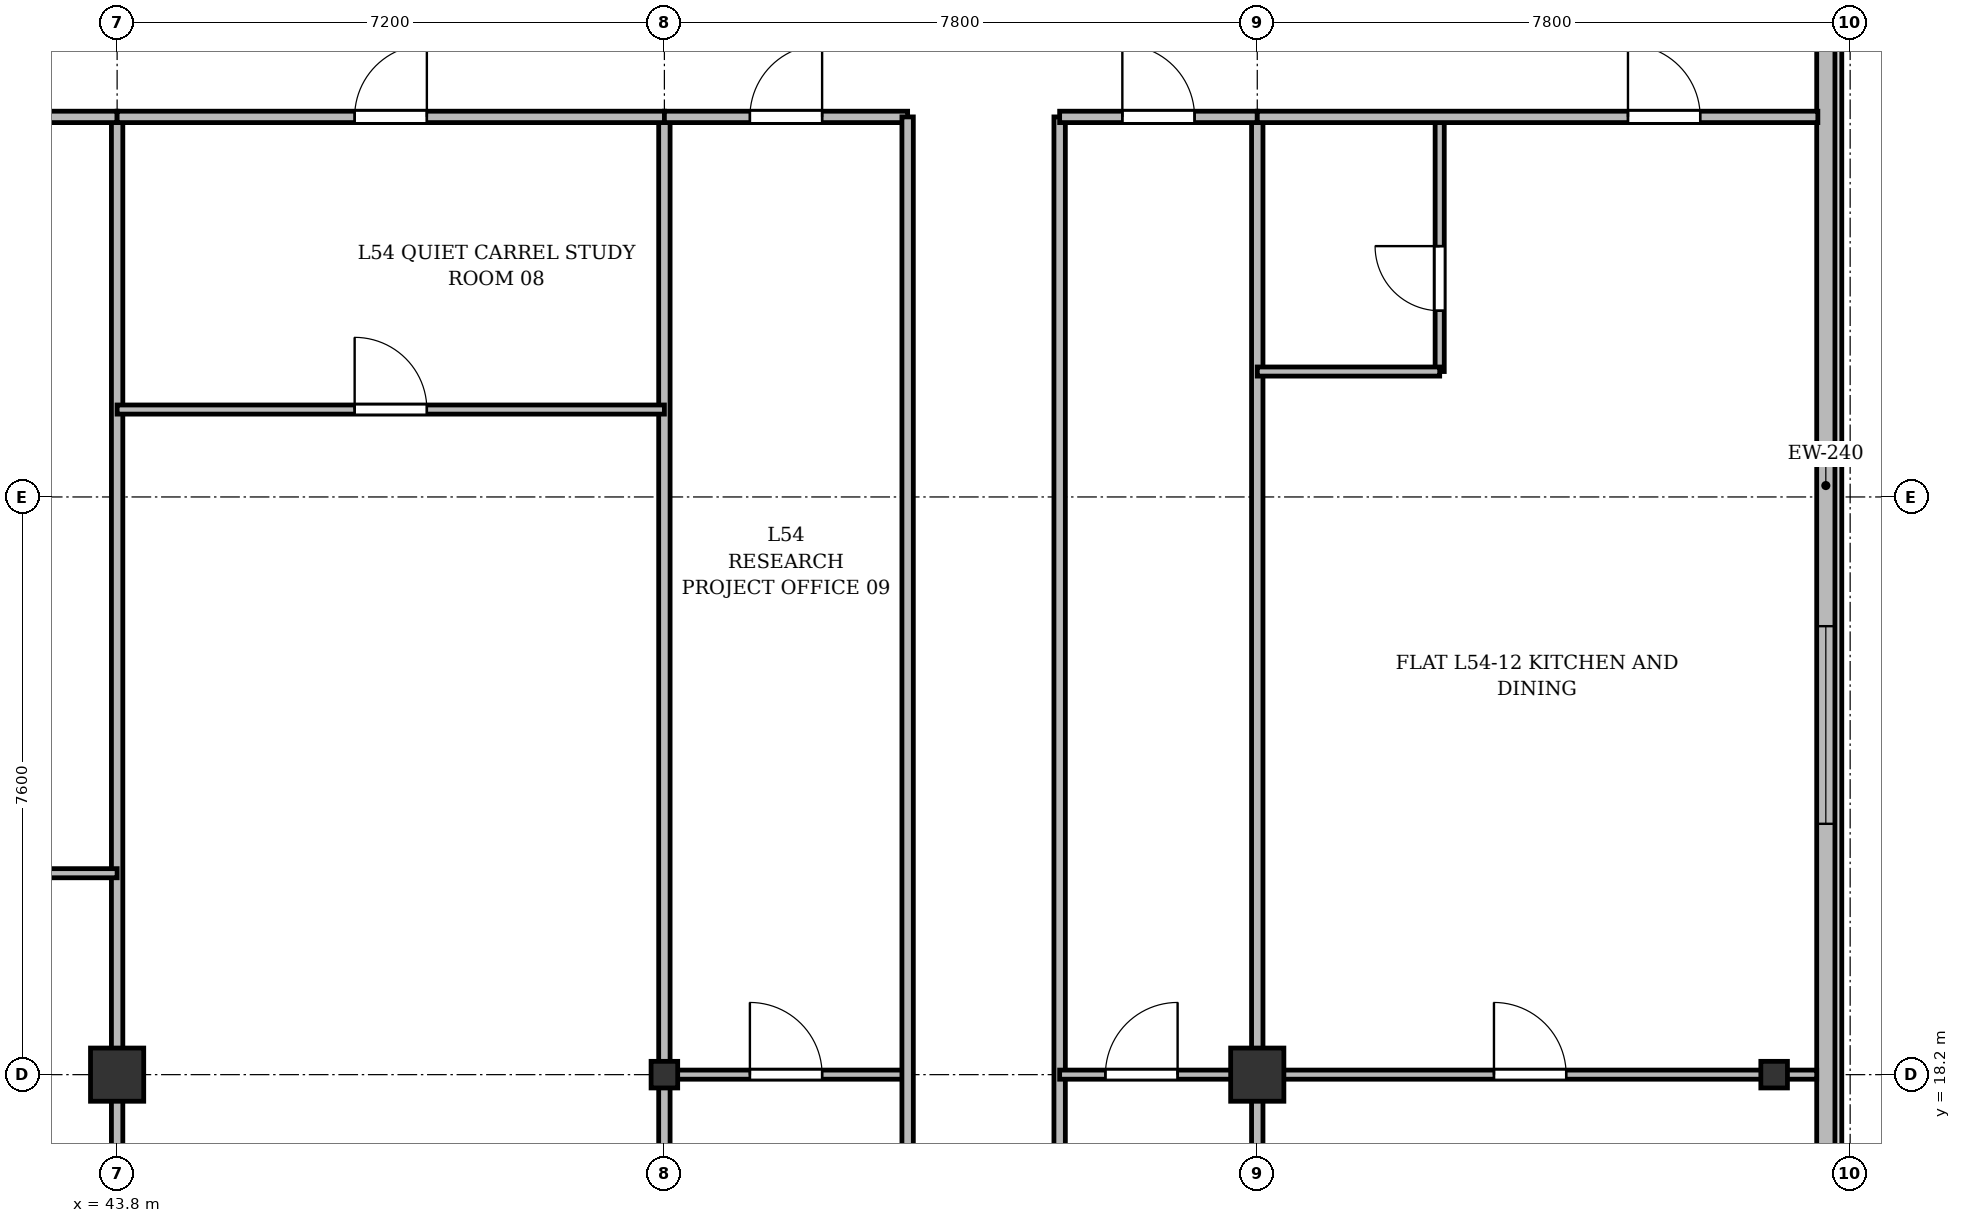
"""IFC4 building model, lengths in metres.
Left out: names, types, materials, properties, quantities, classifications, styles, units other than length and angle.
Written with IfcOpenShell. Run it as: python <this file> out.ifc"""

import sys

from ifc_helpers import new_model, si_unit, direction, frame, frame_2d, origin, origin_2d, place, context, subcontext, project, spatial, rectangle, i_section, extrude, source, transform, mapped, element, fill, save


model = new_model("IFC4")
c1 = context("Model", 3, precision=1e-05, world=origin(), true_north=direction((0.0, 1.0)))
c2 = subcontext(c1, "Body", "Model", "MODEL_VIEW")
j1 = project(units=[si_unit("LENGTHUNIT", "METRE"), si_unit("PLANEANGLEUNIT", "RADIAN")], contexts=[c1])
p1 = place(None, origin())
s1 = spatial("IfcSite", under=j1, at=p1, CompositionType="ELEMENT")
p2 = place(p1, origin())
s2 = spatial("IfcBuilding", under=s1, at=p2, CompositionType="ELEMENT")
p3 = place(p2, frame((0.0, 0.0, 208.5)))
s3 = spatial("IfcBuildingStorey", under=s2, at=p3, CompositionType="ELEMENT", Elevation=208.5)
m1 = source(origin(), c2, "Body", "SweptSolid", [
    extrude(rectangle(XDim=0.7, YDim=0.7, at=origin_2d()), origin(), (0.0, 0.0, 1.0), 3.6),
])
p4 = place(p3, frame((43.8, 18.2, 0.0), z_axis=(0.0, 0.0, 1.0), x_axis=(1.0, 0.0, 0.0)))
e1 = element("IfcColumn", 1, at=p4, inside=s3, PredefinedType="COLUMN", context=c2, shape_type="MappedRepresentation", body=[
    mapped(m1, transform((0.0, 0.0, 0.0), x_axis=(1.0, 0.0, 0.0), y_axis=(0.0, 1.0, 0.0), z_axis=(0.0, 0.0, 1.0), scale=1.0)),
])
m2 = source(origin(), c2, "Body", "SweptSolid", [
    extrude(i_section(OverallWidth=0.35, OverallDepth=0.35, WebThickness=0.018, FlangeThickness=0.028, at=origin_2d()), origin(), (0.0, 0.0, 1.0), 3.6),
])
p5 = place(p3, frame((51.0, 18.2, 0.0), z_axis=(0.0, 0.0, 1.0), x_axis=(1.0, 0.0, 0.0)))
e2 = element("IfcColumn", 2, at=p5, inside=s3, PredefinedType="COLUMN", context=c2, shape_type="MappedRepresentation", body=[
    mapped(m2, transform((0.0, 0.0, 0.0), x_axis=(1.0, 0.0, 0.0), y_axis=(0.0, 1.0, 0.0), z_axis=(0.0, 0.0, 1.0), scale=1.0)),
])
p6 = place(p3, frame((58.8, 18.2, 0.0), z_axis=(0.0, 0.0, 1.0), x_axis=(1.0, 0.0, 0.0)))
e3 = element("IfcColumn", 3, at=p6, inside=s3, PredefinedType="COLUMN", context=c2, shape_type="MappedRepresentation", body=[
    mapped(m1, transform((0.0, 0.0, 0.0), x_axis=(1.0, 0.0, 0.0), y_axis=(0.0, 1.0, 0.0), z_axis=(0.0, 0.0, 1.0), scale=1.0)),
])
p7 = place(p3, frame((65.6, 18.2, 0.0), z_axis=(0.0, 0.0, 1.0), x_axis=(1.0, 0.0, 0.0)))
e4 = element("IfcColumn", 4, at=p7, inside=s3, PredefinedType="COLUMN", context=c2, shape_type="MappedRepresentation", body=[
    mapped(m2, transform((0.0, 0.0, 0.0), x_axis=(1.0, 0.0, 0.0), y_axis=(0.0, 1.0, 0.0), z_axis=(0.0, 0.0, 1.0), scale=1.0)),
])
p8 = place(p3, frame((66.28, 45.5, 0.0), z_axis=(0.0, 0.0, 1.0), x_axis=(0.0, -1.0, 0.0)))
e5 = element("IfcWall", 5, at=p8, inside=s3, PredefinedType="SOLIDWALL", context=c2, shape_type="SweptSolid", body=[
    extrude(rectangle(XDim=39.1, YDim=0.24, at=frame_2d((19.55, 0.0))), origin(), (0.0, 0.0, 1.0), 3.36),
])
p9 = place(p8, frame((36.45, 0.0, 0.92)))
e6 = element("IfcOpeningElement", 6, at=p9, cuts=e5, PredefinedType="OPENING", context=c2, shape_type="SweptSolid", body=[
    extrude(rectangle(XDim=1.2, YDim=1.65, at=frame_2d((0.6, 0.825))), frame((0.0, 0.13, 0.0), z_axis=(0.0, -1.0, 0.0), x_axis=(1.0, 0.0, 0.0)), (0.0, 0.0, 1.0), 0.26),
])
p10 = place(p8, frame((32.8, 0.0, 0.92)))
e7 = element("IfcOpeningElement", 7, at=p10, cuts=e5, PredefinedType="OPENING", context=c2, shape_type="SweptSolid", body=[
    extrude(rectangle(XDim=2.6, YDim=1.9, at=frame_2d((1.3, 0.95))), frame((0.0, 0.13, 0.0), z_axis=(0.0, -1.0, 0.0), x_axis=(1.0, 0.0, 0.0)), (0.0, 0.0, 1.0), 0.26),
])
p11 = place(p8, frame((28.6, 0.0, 0.92)))
e8 = element("IfcOpeningElement", 8, at=p11, cuts=e5, PredefinedType="OPENING", context=c2, shape_type="SweptSolid", body=[
    extrude(rectangle(XDim=2.6, YDim=1.9, at=frame_2d((1.3, 0.95))), frame((0.0, 0.13, 0.0), z_axis=(0.0, -1.0, 0.0), x_axis=(1.0, 0.0, 0.0)), (0.0, 0.0, 1.0), 0.26),
])
p12 = place(p8, frame((21.4, 0.0, 0.92)))
e9 = element("IfcOpeningElement", 9, at=p12, cuts=e5, PredefinedType="OPENING", context=c2, shape_type="SweptSolid", body=[
    extrude(rectangle(XDim=2.6, YDim=1.9, at=frame_2d((1.3, 0.95))), frame((0.0, 0.13, 0.0), z_axis=(0.0, -1.0, 0.0), x_axis=(1.0, 0.0, 0.0)), (0.0, 0.0, 1.0), 0.26),
])
p13 = place(p8, frame((7.4, 0.0, 0.92)))
e10 = element("IfcOpeningElement", 10, at=p13, cuts=e5, PredefinedType="OPENING", context=c2, shape_type="SweptSolid", body=[
    extrude(rectangle(XDim=2.6, YDim=1.9, at=frame_2d((1.3, 0.95))), frame((0.0, 0.13, 0.0), z_axis=(0.0, -1.0, 0.0), x_axis=(1.0, 0.0, 0.0)), (0.0, 0.0, 1.0), 0.26),
])
p14 = place(p8, frame((4.5, 0.0, 0.92)))
e11 = element("IfcOpeningElement", 11, at=p14, cuts=e5, PredefinedType="OPENING", context=c2, shape_type="SweptSolid", body=[
    extrude(rectangle(XDim=1.2, YDim=1.65, at=frame_2d((0.6, 0.825))), frame((0.0, 0.13, 0.0), z_axis=(0.0, -1.0, 0.0), x_axis=(1.0, 0.0, 0.0)), (0.0, 0.0, 1.0), 0.26),
])
p15 = place(p8, frame((1.15, 0.0, 0.92)))
e12 = element("IfcOpeningElement", 12, at=p15, cuts=e5, PredefinedType="OPENING", context=c2, shape_type="SweptSolid", body=[
    extrude(rectangle(XDim=1.2, YDim=1.65, at=frame_2d((0.6, 0.825))), frame((0.0, 0.13, 0.0), z_axis=(0.0, -1.0, 0.0), x_axis=(1.0, 0.0, 0.0)), (0.0, 0.0, 1.0), 0.26),
])
for number, where, z_axis, x_axis in (
    (13, (43.8, 3.625, 0.0), (0.0, 0.0, 1.0), (0.0, 1.0, 0.0)),
    (14, (51.0, 3.625, 0.0), (0.0, 0.0, 1.0), (0.0, 1.0, 0.0)),
    (15, (58.8, 3.625, 0.0), (0.0, 0.0, 1.0), (0.0, 1.0, 0.0)),
):
    element("IfcWall", number, at=place(p3, frame(where, z_axis=z_axis, x_axis=x_axis)), inside=s3, PredefinedType="PARTITIONING", context=c2, shape_type="SweptSolid", body=[
        extrude(rectangle(XDim=27.175, YDim=0.15, at=frame_2d((13.587, 0.0))), origin(), (0.0, 0.0, 1.0), 2.86),
    ])
p16 = place(p3, frame((35.8, 20.85, 0.0), z_axis=(0.0, 0.0, 1.0), x_axis=(1.0, 0.0, 0.0)))
e16 = element("IfcWall", 16, at=p16, inside=s3, PredefinedType="PARTITIONING", context=c2, shape_type="SweptSolid", body=[
    extrude(rectangle(XDim=8.0, YDim=0.12, at=frame_2d((4.0, 0.0))), origin(), (0.0, 0.0, 1.0), 2.86),
])
p17 = place(p16, frame((3.525, 0.0, 0.0)))
e17 = element("IfcOpeningElement", 17, at=p17, cuts=e16, PredefinedType="OPENING", context=c2, shape_type="SweptSolid", body=[
    extrude(rectangle(XDim=0.95, YDim=2.15, at=frame_2d((0.475, 1.075))), frame((0.0, 0.07, 0.0), z_axis=(0.0, -1.0, 0.0), x_axis=(1.0, 0.0, 0.0)), (0.0, 0.0, 1.0), 0.14),
])
p18 = place(p3, frame((35.8, 30.8, 0.0), z_axis=(0.0, 0.0, 1.0), x_axis=(1.0, 0.0, 0.0)))
e18 = element("IfcWall", 18, at=p18, inside=s3, PredefinedType="PARTITIONING", context=c2, shape_type="SweptSolid", body=[
    extrude(rectangle(XDim=8.0, YDim=0.15, at=frame_2d((4.0, 0.0))), origin(), (0.0, 0.0, 1.0), 2.86),
])
p19 = place(p18, frame((5.367, 0.0, 0.0)))
e19 = element("IfcOpeningElement", 19, at=p19, cuts=e18, PredefinedType="OPENING", context=c2, shape_type="SweptSolid", body=[
    extrude(rectangle(XDim=0.95, YDim=2.15, at=frame_2d((0.475, 1.075))), frame((0.0, 0.085, 0.0), z_axis=(0.0, -1.0, 0.0), x_axis=(1.0, 0.0, 0.0)), (0.0, 0.0, 1.0), 0.17),
])
p20 = place(p3, frame((43.8, 30.8, 0.0), z_axis=(0.0, 0.0, 1.0), x_axis=(1.0, 0.0, 0.0)))
e20 = element("IfcWall", 20, at=p20, inside=s3, PredefinedType="PARTITIONING", context=c2, shape_type="SweptSolid", body=[
    extrude(rectangle(XDim=7.2, YDim=0.15, at=frame_2d((3.6, 0.0))), origin(), (0.0, 0.0, 1.0), 2.86),
])
p21 = place(p20, frame((3.125, 0.0, 0.0)))
e21 = element("IfcOpeningElement", 21, at=p21, cuts=e20, PredefinedType="OPENING", context=c2, shape_type="SweptSolid", body=[
    extrude(rectangle(XDim=0.95, YDim=2.15, at=frame_2d((0.475, 1.075))), frame((0.0, 0.085, 0.0), z_axis=(0.0, -1.0, 0.0), x_axis=(1.0, 0.0, 0.0)), (0.0, 0.0, 1.0), 0.17),
])
p22 = place(p3, frame((43.8, 26.95, 0.0), z_axis=(0.0, 0.0, 1.0), x_axis=(1.0, 0.0, 0.0)))
e22 = element("IfcWall", 22, at=p22, inside=s3, PredefinedType="PARTITIONING", context=c2, shape_type="SweptSolid", body=[
    extrude(rectangle(XDim=7.2, YDim=0.12, at=frame_2d((3.6, 0.0))), origin(), (0.0, 0.0, 1.0), 2.86),
])
p23 = place(p22, frame((3.125, 0.0, 0.0)))
e23 = element("IfcOpeningElement", 23, at=p23, cuts=e22, PredefinedType="OPENING", context=c2, shape_type="SweptSolid", body=[
    extrude(rectangle(XDim=0.95, YDim=2.15, at=frame_2d((0.475, 1.075))), frame((0.0, 0.07, 0.0), z_axis=(0.0, -1.0, 0.0), x_axis=(1.0, 0.0, 0.0)), (0.0, 0.0, 1.0), 0.14),
])
p24 = place(p3, frame((51.0, 30.8, 0.0), z_axis=(0.0, 0.0, 1.0), x_axis=(1.0, 0.0, 0.0)))
e24 = element("IfcWall", 24, at=p24, inside=s3, PredefinedType="PARTITIONING", context=c2, shape_type="SweptSolid", body=[
    extrude(rectangle(XDim=3.2, YDim=0.15, at=frame_2d((1.6, 0.0))), origin(), (0.0, 0.0, 1.0), 2.86),
])
p25 = place(p24, frame((1.125, 0.0, 0.0)))
e25 = element("IfcOpeningElement", 25, at=p25, cuts=e24, PredefinedType="OPENING", context=c2, shape_type="SweptSolid", body=[
    extrude(rectangle(XDim=0.95, YDim=2.15, at=frame_2d((0.475, 1.075))), frame((0.0, 0.085, 0.0), z_axis=(0.0, -1.0, 0.0), x_axis=(1.0, 0.0, 0.0)), (0.0, 0.0, 1.0), 0.17),
])
p26 = place(p3, frame((51.0, 18.2, 0.0), z_axis=(0.0, 0.0, 1.0), x_axis=(1.0, 0.0, 0.0)))
e26 = element("IfcWall", 26, at=p26, inside=s3, PredefinedType="PARTITIONING", context=c2, shape_type="SweptSolid", body=[
    extrude(rectangle(XDim=3.2, YDim=0.12, at=frame_2d((1.6, 0.0))), origin(), (0.0, 0.0, 1.0), 2.91),
])
p27 = place(p26, frame((1.125, 0.0, 0.0)))
e27 = element("IfcOpeningElement", 27, at=p27, cuts=e26, PredefinedType="OPENING", context=c2, shape_type="SweptSolid", body=[
    extrude(rectangle(XDim=0.95, YDim=2.15, at=frame_2d((0.475, 1.075))), frame((0.0, 0.07, 0.0), z_axis=(0.0, -1.0, 0.0), x_axis=(1.0, 0.0, 0.0)), (0.0, 0.0, 1.0), 0.14),
])
for number, where, z_axis, x_axis in (
    (28, (54.2, 3.625, 0.0), (0.0, 0.0, 1.0), (0.0, 1.0, 0.0)),
    (29, (56.2, 3.625, 0.0), (0.0, 0.0, 1.0), (0.0, 1.0, 0.0)),
):
    element("IfcWall", number, at=place(p3, frame(where, z_axis=z_axis, x_axis=x_axis)), inside=s3, PredefinedType="PARTITIONING", context=c2, shape_type="SweptSolid", body=[
        extrude(rectangle(XDim=27.175, YDim=0.15, at=frame_2d((13.587, 0.0))), origin(), (0.0, 0.0, 1.0), 2.91),
    ])
p28 = place(p3, frame((56.2, 30.8, 0.0), z_axis=(0.0, 0.0, 1.0), x_axis=(1.0, 0.0, 0.0)))
e30 = element("IfcWall", 30, at=p28, inside=s3, PredefinedType="PARTITIONING", context=c2, shape_type="SweptSolid", body=[
    extrude(rectangle(XDim=2.6, YDim=0.15, at=frame_2d((1.3, 0.0))), origin(), (0.0, 0.0, 1.0), 2.86),
])
p29 = place(p28, frame((0.825, 0.0, 0.0)))
e31 = element("IfcOpeningElement", 31, at=p29, cuts=e30, PredefinedType="OPENING", context=c2, shape_type="SweptSolid", body=[
    extrude(rectangle(XDim=0.95, YDim=2.15, at=frame_2d((0.475, 1.075))), frame((0.0, 0.085, 0.0), z_axis=(0.0, -1.0, 0.0), x_axis=(1.0, 0.0, 0.0)), (0.0, 0.0, 1.0), 0.17),
])
p30 = place(p3, frame((56.2, 18.2, 0.0), z_axis=(0.0, 0.0, 1.0), x_axis=(1.0, 0.0, 0.0)))
e32 = element("IfcWall", 32, at=p30, inside=s3, PredefinedType="PARTITIONING", context=c2, shape_type="SweptSolid", body=[
    extrude(rectangle(XDim=2.6, YDim=0.12, at=frame_2d((1.3, 0.0))), origin(), (0.0, 0.0, 1.0), 2.91),
])
p31 = place(p30, frame((0.602, 0.0, 0.0)))
e33 = element("IfcOpeningElement", 33, at=p31, cuts=e32, PredefinedType="OPENING", context=c2, shape_type="SweptSolid", body=[
    extrude(rectangle(XDim=0.95, YDim=2.15, at=frame_2d((0.475, 1.075))), frame((0.0, 0.07, 0.0), z_axis=(0.0, -1.0, 0.0), x_axis=(1.0, 0.0, 0.0)), (0.0, 0.0, 1.0), 0.14),
])
p32 = place(p3, frame((58.8, 18.2, 0.0), z_axis=(0.0, 0.0, 1.0), x_axis=(1.0, 0.0, 0.0)))
e34 = element("IfcWall", 34, at=p32, inside=s3, PredefinedType="PARTITIONING", context=c2, shape_type="SweptSolid", body=[
    extrude(rectangle(XDim=7.36, YDim=0.12, at=frame_2d((3.68, 0.0))), origin(), (0.0, 0.0, 1.0), 2.91),
])
p33 = place(p32, frame((3.114, 0.0, 0.0)))
e35 = element("IfcOpeningElement", 35, at=p33, cuts=e34, PredefinedType="OPENING", context=c2, shape_type="SweptSolid", body=[
    extrude(rectangle(XDim=0.95, YDim=2.15, at=frame_2d((0.475, 1.075))), frame((0.0, 0.07, 0.0), z_axis=(0.0, -1.0, 0.0), x_axis=(1.0, 0.0, 0.0)), (0.0, 0.0, 1.0), 0.14),
])
p34 = place(p3, frame((61.2, 27.45, 0.0), z_axis=(0.0, 0.0, 1.0), x_axis=(0.0, 1.0, 0.0)))
e36 = element("IfcWall", 36, at=p34, inside=s3, PredefinedType="PARTITIONING", context=c2, shape_type="SweptSolid", body=[
    extrude(rectangle(XDim=3.35, YDim=0.12, at=frame_2d((1.675, 0.0))), origin(), (0.0, 0.0, 1.0), 3.36),
])
p35 = place(p34, frame((0.8, 0.0, 0.0)))
e37 = element("IfcOpeningElement", 37, at=p35, cuts=e36, PredefinedType="OPENING", context=c2, shape_type="SweptSolid", body=[
    extrude(rectangle(XDim=0.85, YDim=2.1, at=frame_2d((0.425, 1.05))), frame((0.0, 0.07, 0.0), z_axis=(0.0, -1.0, 0.0), x_axis=(1.0, 0.0, 0.0)), (0.0, 0.0, 1.0), 0.14),
])
p36 = place(p3, frame((58.8, 27.45, 0.0), z_axis=(0.0, 0.0, 1.0), x_axis=(1.0, 0.0, 0.0)))
e38 = element("IfcWall", 38, at=p36, inside=s3, PredefinedType="PARTITIONING", context=c2, shape_type="SweptSolid", body=[
    extrude(rectangle(XDim=2.4, YDim=0.12, at=frame_2d((1.2, 0.0))), origin(), (0.0, 0.0, 1.0), 2.86),
])
p37 = place(p3, frame((58.8, 30.8, 0.0), z_axis=(0.0, 0.0, 1.0), x_axis=(1.0, 0.0, 0.0)))
e39 = element("IfcWall", 39, at=p37, inside=s3, PredefinedType="PARTITIONING", context=c2, shape_type="SweptSolid", body=[
    extrude(rectangle(XDim=7.375, YDim=0.15, at=frame_2d((3.688, 0.0))), origin(), (0.0, 0.0, 1.0), 2.86),
])
p38 = place(p37, frame((4.877, 0.0, 0.0)))
e40 = element("IfcOpeningElement", 40, at=p38, cuts=e39, PredefinedType="OPENING", context=c2, shape_type="SweptSolid", body=[
    extrude(rectangle(XDim=0.95, YDim=2.15, at=frame_2d((0.475, 1.075))), frame((0.0, 0.085, 0.0), z_axis=(0.0, -1.0, 0.0), x_axis=(1.0, 0.0, 0.0)), (0.0, 0.0, 1.0), 0.17),
])
m3 = source(origin(), c2, "Body", "SweptSolid", [
    extrude(rectangle(XDim=2.6, YDim=1.9, at=frame_2d((1.3, 0.95))), frame((0.0, 0.03, 0.0), z_axis=(0.0, -1.0, 0.0), x_axis=(1.0, 0.0, 0.0)), (0.0, 0.0, 1.0), 0.06),
])
p39 = place(p12, origin())
e41 = element("IfcWindow", 41, at=p39, inside=s3, PartitioningType="SINGLE_PANEL", PredefinedType="WINDOW", context=c2, shape_type="MappedRepresentation", body=[
    mapped(m3, transform((0.0, 0.0, 0.0), x_axis=(1.0, 0.0, 0.0), y_axis=(0.0, 1.0, 0.0), z_axis=(0.0, 0.0, 1.0), scale=1.0)),
])
fill(e9, e41)
m4 = source(origin(), c2, "Body", "SweptSolid", [
    extrude(rectangle(XDim=0.95, YDim=2.15, at=frame_2d((0.475, 1.075))), frame((0.0, 0.025, 0.0), z_axis=(0.0, -1.0, 0.0), x_axis=(1.0, 0.0, 0.0)), (0.0, 0.0, 1.0), 0.05),
])
p40 = place(p21, origin())
e42 = element("IfcDoor", 42, at=p40, inside=s3, OperationType="SINGLE_SWING_RIGHT", PredefinedType="DOOR", context=c2, shape_type="MappedRepresentation", body=[
    mapped(m4, transform((0.0, 0.0, 0.0), x_axis=(1.0, 0.0, 0.0), y_axis=(0.0, 1.0, 0.0), z_axis=(0.0, 0.0, 1.0), scale=1.0)),
])
fill(e21, e42)
p41 = place(p23, origin())
e43 = element("IfcDoor", 43, at=p41, inside=s3, OperationType="SINGLE_SWING_LEFT", PredefinedType="DOOR", context=c2, shape_type="MappedRepresentation", body=[
    mapped(m4, transform((0.0, 0.0, 0.0), x_axis=(1.0, 0.0, 0.0), y_axis=(0.0, 1.0, 0.0), z_axis=(0.0, 0.0, 1.0), scale=1.0)),
])
fill(e23, e43)
p42 = place(p25, origin())
e44 = element("IfcDoor", 44, at=p42, inside=s3, OperationType="SINGLE_SWING_RIGHT", PredefinedType="DOOR", context=c2, shape_type="MappedRepresentation", body=[
    mapped(m4, transform((0.0, 0.0, 0.0), x_axis=(1.0, 0.0, 0.0), y_axis=(0.0, 1.0, 0.0), z_axis=(0.0, 0.0, 1.0), scale=1.0)),
])
fill(e25, e44)
p43 = place(p27, origin())
e45 = element("IfcDoor", 45, at=p43, inside=s3, OperationType="SINGLE_SWING_LEFT", PredefinedType="DOOR", context=c2, shape_type="MappedRepresentation", body=[
    mapped(m4, transform((0.0, 0.0, 0.0), x_axis=(1.0, 0.0, 0.0), y_axis=(0.0, 1.0, 0.0), z_axis=(0.0, 0.0, 1.0), scale=1.0)),
])
fill(e27, e45)
p44 = place(p29, origin())
e46 = element("IfcDoor", 46, at=p44, inside=s3, OperationType="SINGLE_SWING_LEFT", PredefinedType="DOOR", context=c2, shape_type="MappedRepresentation", body=[
    mapped(m4, transform((0.0, 0.0, 0.0), x_axis=(1.0, 0.0, 0.0), y_axis=(0.0, 1.0, 0.0), z_axis=(0.0, 0.0, 1.0), scale=1.0)),
])
fill(e31, e46)
p45 = place(p31, origin())
e47 = element("IfcDoor", 47, at=p45, inside=s3, OperationType="SINGLE_SWING_RIGHT", PredefinedType="DOOR", context=c2, shape_type="MappedRepresentation", body=[
    mapped(m4, transform((0.0, 0.0, 0.0), x_axis=(1.0, 0.0, 0.0), y_axis=(0.0, 1.0, 0.0), z_axis=(0.0, 0.0, 1.0), scale=1.0)),
])
fill(e33, e47)
p46 = place(p33, origin())
e48 = element("IfcDoor", 48, at=p46, inside=s3, OperationType="SINGLE_SWING_LEFT", PredefinedType="DOOR", context=c2, shape_type="MappedRepresentation", body=[
    mapped(m4, transform((0.0, 0.0, 0.0), x_axis=(1.0, 0.0, 0.0), y_axis=(0.0, 1.0, 0.0), z_axis=(0.0, 0.0, 1.0), scale=1.0)),
])
fill(e35, e48)
m5 = source(origin(), c2, "Body", "SweptSolid", [
    extrude(rectangle(XDim=0.85, YDim=2.1, at=frame_2d((0.425, 1.05))), frame((0.0, 0.025, 0.0), z_axis=(0.0, -1.0, 0.0), x_axis=(1.0, 0.0, 0.0)), (0.0, 0.0, 1.0), 0.05),
])
p47 = place(p35, origin())
e49 = element("IfcDoor", 49, at=p47, inside=s3, OperationType="SINGLE_SWING_RIGHT", PredefinedType="DOOR", context=c2, shape_type="MappedRepresentation", body=[
    mapped(m5, transform((0.0, 0.0, 0.0), x_axis=(1.0, 0.0, 0.0), y_axis=(0.0, 1.0, 0.0), z_axis=(0.0, 0.0, 1.0), scale=1.0)),
])
fill(e37, e49)
p48 = place(p38, origin())
e50 = element("IfcDoor", 50, at=p48, inside=s3, OperationType="SINGLE_SWING_LEFT", PredefinedType="DOOR", context=c2, shape_type="MappedRepresentation", body=[
    mapped(m4, transform((0.0, 0.0, 0.0), x_axis=(1.0, 0.0, 0.0), y_axis=(0.0, 1.0, 0.0), z_axis=(0.0, 0.0, 1.0), scale=1.0)),
])
fill(e40, e50)
save(model, sys.argv[1])
